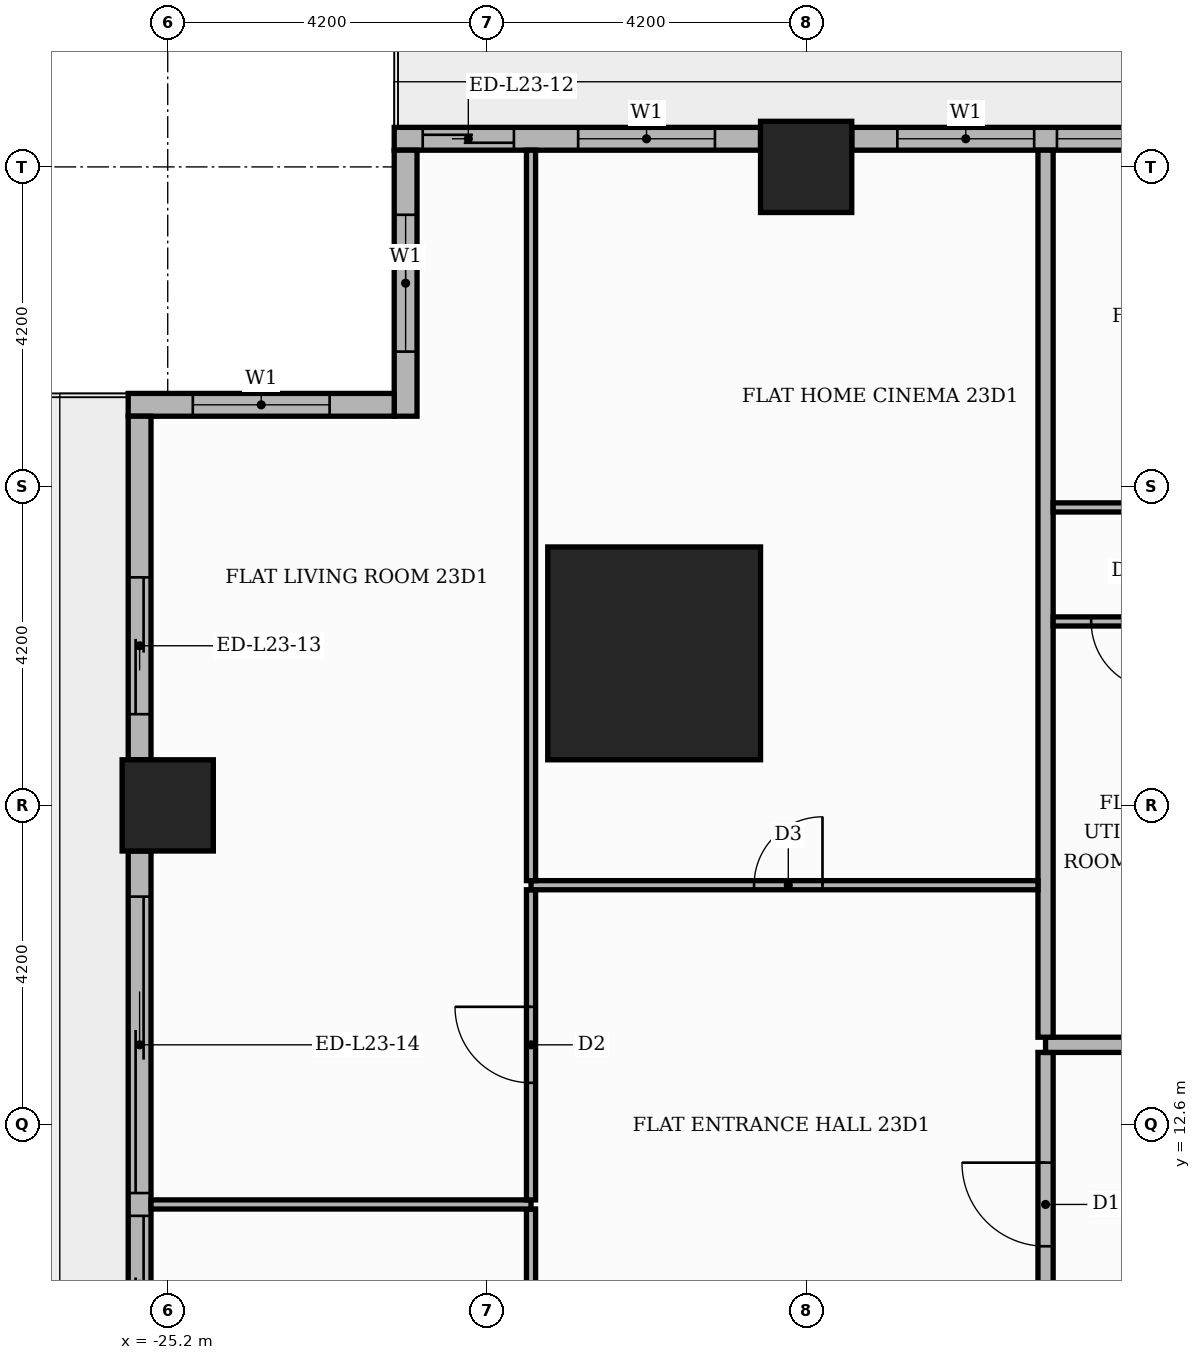
"""IFC4 building model, lengths in metres.
Left out: names, types, materials, properties, quantities, classifications, styles, units other than length and angle.
Written with IfcOpenShell. Run it as: python <this file> out.ifc"""

import sys

from ifc_helpers import new_model, si_unit, direction, frame, frame_2d, origin, origin_2d, place, context, subcontext, project, spatial, rectangle, extrude, element, fill, save


model = new_model("IFC4")
c1 = context("Model", 3, precision=1e-05, world=origin(), true_north=direction((0.0, 1.0)))
c2 = subcontext(c1, "Body", "Model", "MODEL_VIEW")
j1 = project(units=[si_unit("LENGTHUNIT", "METRE"), si_unit("PLANEANGLEUNIT", "RADIAN")], contexts=[c1])
p1 = place(None, origin())
s1 = spatial("IfcSite", under=j1, at=p1, CompositionType="ELEMENT")
p2 = place(p1, origin())
s2 = spatial("IfcBuilding", under=s1, at=p2, CompositionType="ELEMENT")
p3 = place(p2, frame((0.0, 0.0, 98.7)))
s3 = spatial("IfcBuildingStorey", under=s2, at=p3, CompositionType="ELEMENT", Elevation=98.7)
p4 = place(p3, frame((-18.8, 18.8, 0.0), z_axis=(0.0, 0.0, 1.0), x_axis=(1.0, 0.0, 0.0)))
e1 = element("IfcColumn", 1, at=p4, inside=s3, PredefinedType="COLUMN", context=c2, shape_type="SweptSolid", body=[
    extrude(rectangle(XDim=2.8, YDim=2.8, at=origin_2d()), origin(), (0.0, 0.0, 1.0), 3.9),
])
for number, where, z_axis, x_axis in (
    (2, (-16.8, 25.2, 0.0), (0.0, 0.0, 1.0), (1.0, 0.0, 0.0)),
    (3, (-25.2, 16.8, 0.0), (0.0, 0.0, 1.0), (1.0, 0.0, 0.0)),
):
    element("IfcColumn", number, at=place(p3, frame(where, z_axis=z_axis, x_axis=x_axis)), inside=s3, PredefinedType="COLUMN", context=c2, shape_type="SweptSolid", body=[
        extrude(rectangle(XDim=1.2, YDim=1.2, at=origin_2d()), origin(), (0.0, 0.0, 1.0), 3.9),
    ])
p5 = place(p3, frame((-9.0, 25.57, 0.0), z_axis=(0.0, 0.0, 1.0), x_axis=(-1.0, 0.0, 0.0)))
e4 = element("IfcWall", 4, at=p5, inside=s3, PredefinedType="STANDARD", context=c2, shape_type="SweptSolid", body=[
    extrude(rectangle(XDim=7.2, YDim=0.3, at=frame_2d((3.6, 0.0))), origin(), (0.0, 0.0, 1.0), 3.48),
])
p6 = place(p5, frame((0.6, 0.0, 0.9)))
e5 = element("IfcOpeningElement", 5, at=p6, cuts=e4, PredefinedType="OPENING", context=c2, shape_type="SweptSolid", body=[
    extrude(rectangle(XDim=3.9, YDim=2.1, at=frame_2d((1.95, 1.05))), frame((0.0, 0.16, 0.0), z_axis=(0.0, -1.0, 0.0), x_axis=(1.0, 0.0, 0.0)), (0.0, 0.0, 1.0), 0.32),
])
p7 = place(p5, frame((4.8, 0.0, 0.9)))
e6 = element("IfcOpeningElement", 6, at=p7, cuts=e4, PredefinedType="OPENING", context=c2, shape_type="SweptSolid", body=[
    extrude(rectangle(XDim=1.8, YDim=2.1, at=frame_2d((0.9, 1.05))), frame((0.0, 0.16, 0.0), z_axis=(0.0, -1.0, 0.0), x_axis=(1.0, 0.0, 0.0)), (0.0, 0.0, 1.0), 0.32),
])
p8 = place(p3, frame((-17.4, 25.57, 0.0), z_axis=(0.0, 0.0, 1.0), x_axis=(-1.0, 0.0, 0.0)))
e7 = element("IfcWall", 7, at=p8, inside=s3, PredefinedType="STANDARD", context=c2, shape_type="SweptSolid", body=[
    extrude(rectangle(XDim=4.82, YDim=0.3, at=frame_2d((2.41, 0.0))), origin(), (0.0, 0.0, 1.0), 3.48),
])
p9 = place(p8, frame((0.6, 0.0, 0.9)))
e8 = element("IfcOpeningElement", 8, at=p9, cuts=e7, PredefinedType="OPENING", context=c2, shape_type="SweptSolid", body=[
    extrude(rectangle(XDim=1.8, YDim=2.1, at=frame_2d((0.9, 1.05))), frame((0.0, 0.16, 0.0), z_axis=(0.0, -1.0, 0.0), x_axis=(1.0, 0.0, 0.0)), (0.0, 0.0, 1.0), 0.32),
])
p10 = place(p8, frame((3.245, 0.0, 0.0)))
e9 = element("IfcOpeningElement", 9, at=p10, cuts=e7, PredefinedType="OPENING", context=c2, shape_type="SweptSolid", body=[
    extrude(rectangle(XDim=1.2, YDim=2.4, at=frame_2d((0.6, 1.2))), frame((0.0, 0.16, 0.0), z_axis=(0.0, -1.0, 0.0), x_axis=(1.0, 0.0, 0.0)), (0.0, 0.0, 1.0), 0.32),
])
p11 = place(p3, frame((-22.07, 25.42, 0.0), z_axis=(0.0, 0.0, 1.0), x_axis=(0.0, -1.0, 0.0)))
e10 = element("IfcWall", 10, at=p11, inside=s3, PredefinedType="STANDARD", context=c2, shape_type="SweptSolid", body=[
    extrude(rectangle(XDim=3.5, YDim=0.3, at=frame_2d((1.75, 0.0))), origin(), (0.0, 0.0, 1.0), 3.48),
])
p12 = place(p11, frame((0.85, 0.0, 0.9)))
e11 = element("IfcOpeningElement", 11, at=p12, cuts=e10, PredefinedType="OPENING", context=c2, shape_type="SweptSolid", body=[
    extrude(rectangle(XDim=1.8, YDim=2.1, at=frame_2d((0.9, 1.05))), frame((0.0, 0.16, 0.0), z_axis=(0.0, -1.0, 0.0), x_axis=(1.0, 0.0, 0.0)), (0.0, 0.0, 1.0), 0.32),
])
p13 = place(p3, frame((-22.22, 22.07, 0.0), z_axis=(0.0, 0.0, 1.0), x_axis=(-1.0, 0.0, 0.0)))
e12 = element("IfcWall", 12, at=p13, inside=s3, PredefinedType="STANDARD", context=c2, shape_type="SweptSolid", body=[
    extrude(rectangle(XDim=3.5, YDim=0.3, at=frame_2d((1.75, 0.0))), origin(), (0.0, 0.0, 1.0), 3.48),
])
p14 = place(p13, frame((0.85, 0.0, 0.9)))
e13 = element("IfcOpeningElement", 13, at=p14, cuts=e12, PredefinedType="OPENING", context=c2, shape_type="SweptSolid", body=[
    extrude(rectangle(XDim=1.8, YDim=2.1, at=frame_2d((0.9, 1.05))), frame((0.0, 0.16, 0.0), z_axis=(0.0, -1.0, 0.0), x_axis=(1.0, 0.0, 0.0)), (0.0, 0.0, 1.0), 0.32),
])
p15 = place(p3, frame((-25.57, 21.92, 0.0), z_axis=(0.0, 0.0, 1.0), x_axis=(0.0, -1.0, 0.0)))
e14 = element("IfcWall", 14, at=p15, inside=s3, PredefinedType="STANDARD", context=c2, shape_type="SweptSolid", body=[
    extrude(rectangle(XDim=4.52, YDim=0.3, at=frame_2d((2.26, 0.0))), origin(), (0.0, 0.0, 1.0), 3.48),
])
p16 = place(p15, frame((2.12, 0.0, 0.0)))
e15 = element("IfcOpeningElement", 15, at=p16, cuts=e14, PredefinedType="OPENING", context=c2, shape_type="SweptSolid", body=[
    extrude(rectangle(XDim=1.8, YDim=2.4, at=frame_2d((0.9, 1.2))), frame((0.0, 0.16, 0.0), z_axis=(0.0, -1.0, 0.0), x_axis=(1.0, 0.0, 0.0)), (0.0, 0.0, 1.0), 0.32),
])
p17 = place(p3, frame((-25.57, 16.2, 0.0), z_axis=(0.0, 0.0, 1.0), x_axis=(0.0, -1.0, 0.0)))
e16 = element("IfcWall", 16, at=p17, inside=s3, PredefinedType="STANDARD", context=c2, shape_type="SweptSolid", body=[
    extrude(rectangle(XDim=7.2, YDim=0.3, at=frame_2d((3.6, 0.0))), origin(), (0.0, 0.0, 1.0), 3.48),
])
p18 = place(p17, frame((0.6, 0.0, 0.0)))
e17 = element("IfcOpeningElement", 17, at=p18, cuts=e16, PredefinedType="OPENING", context=c2, shape_type="SweptSolid", body=[
    extrude(rectangle(XDim=3.9, YDim=2.4, at=frame_2d((1.95, 1.2))), frame((0.0, 0.16, 0.0), z_axis=(0.0, -1.0, 0.0), x_axis=(1.0, 0.0, 0.0)), (0.0, 0.0, 1.0), 0.32),
])
p19 = place(p17, frame((4.8, 0.0, 0.0)))
e18 = element("IfcOpeningElement", 18, at=p19, cuts=e16, PredefinedType="OPENING", context=c2, shape_type="SweptSolid", body=[
    extrude(rectangle(XDim=1.8, YDim=2.4, at=frame_2d((0.9, 1.2))), frame((0.0, 0.16, 0.0), z_axis=(0.0, -1.0, 0.0), x_axis=(1.0, 0.0, 0.0)), (0.0, 0.0, 1.0), 0.32),
])
p20 = place(p3, frame((-13.65, -13.55, 0.0), z_axis=(0.0, 0.0, 1.0), x_axis=(0.0, 1.0, 0.0)))
e19 = element("IfcWall", 19, at=p20, inside=s3, PredefinedType="PARTITIONING", context=c2, shape_type="SweptSolid", body=[
    extrude(rectangle(XDim=27.1, YDim=0.2, at=frame_2d((13.55, 0.0))), origin(), (0.0, 0.0, 1.0), 3.48),
])
p21 = place(p20, frame((24.55, 0.0, 0.0)))
e20 = element("IfcOpeningElement", 20, at=p21, cuts=e19, PredefinedType="OPENING", context=c2, shape_type="SweptSolid", body=[
    extrude(rectangle(XDim=1.1, YDim=2.4, at=frame_2d((0.55, 1.2))), frame((0.0, 0.11, 0.0), z_axis=(0.0, -1.0, 0.0), x_axis=(1.0, 0.0, 0.0)), (0.0, 0.0, 1.0), 0.22),
])
p22 = place(p3, frame((-20.42, 7.41, 0.0), z_axis=(0.0, 0.0, 1.0), x_axis=(0.0, 1.0, 0.0)))
e21 = element("IfcWall", 21, at=p22, inside=s3, PredefinedType="PARTITIONING", context=c2, shape_type="SweptSolid", body=[
    extrude(rectangle(XDim=4.08, YDim=0.12, at=frame_2d((2.04, 0.0))), origin(), (0.0, 0.0, 1.0), 3.48),
])
p23 = place(p22, frame((1.54, 0.0, 0.0)))
e22 = element("IfcOpeningElement", 22, at=p23, cuts=e21, PredefinedType="OPENING", context=c2, shape_type="SweptSolid", body=[
    extrude(rectangle(XDim=1.0, YDim=2.1, at=frame_2d((0.5, 1.05))), frame((0.0, 0.07, 0.0), z_axis=(0.0, -1.0, 0.0), x_axis=(1.0, 0.0, 0.0)), (0.0, 0.0, 1.0), 0.14),
])
p24 = place(p3, frame((-25.42, 11.55, 0.0), z_axis=(0.0, 0.0, 1.0), x_axis=(1.0, 0.0, 0.0)))
e23 = element("IfcWall", 23, at=p24, inside=s3, PredefinedType="PARTITIONING", context=c2, shape_type="SweptSolid", body=[
    extrude(rectangle(XDim=5.0, YDim=0.12, at=frame_2d((2.5, 0.0))), origin(), (0.0, 0.0, 1.0), 3.48),
])
p25 = place(p3, frame((-20.42, 11.61, 0.0), z_axis=(0.0, 0.0, 1.0), x_axis=(0.0, 1.0, 0.0)))
e24 = element("IfcWall", 24, at=p25, inside=s3, PredefinedType="PARTITIONING", context=c2, shape_type="SweptSolid", body=[
    extrude(rectangle(XDim=4.08, YDim=0.12, at=frame_2d((2.04, 0.0))), origin(), (0.0, 0.0, 1.0), 3.48),
])
p26 = place(p25, frame((1.54, 0.0, 0.0)))
e25 = element("IfcOpeningElement", 25, at=p26, cuts=e24, PredefinedType="OPENING", context=c2, shape_type="SweptSolid", body=[
    extrude(rectangle(XDim=1.0, YDim=2.1, at=frame_2d((0.5, 1.05))), frame((0.0, 0.07, 0.0), z_axis=(0.0, -1.0, 0.0), x_axis=(1.0, 0.0, 0.0)), (0.0, 0.0, 1.0), 0.14),
])
p27 = place(p3, frame((-13.65, 13.65, 0.0), z_axis=(0.0, 0.0, 1.0), x_axis=(1.0, 0.0, 0.0)))
e26 = element("IfcWall", 26, at=p27, inside=s3, PredefinedType="PARTITIONING", context=c2, shape_type="SweptSolid", body=[
    extrude(rectangle(XDim=39.07, YDim=0.2, at=frame_2d((19.535, 0.0))), origin(), (0.0, 0.0, 1.0), 3.48),
])
p28 = place(p27, frame((24.65, 0.0, 0.0)))
e27 = element("IfcOpeningElement", 27, at=p28, cuts=e26, PredefinedType="OPENING", context=c2, shape_type="SweptSolid", body=[
    extrude(rectangle(XDim=1.1, YDim=2.4, at=frame_2d((0.55, 1.2))), frame((0.0, 0.11, 0.0), z_axis=(0.0, -1.0, 0.0), x_axis=(1.0, 0.0, 0.0)), (0.0, 0.0, 1.0), 0.22),
])
p29 = place(p27, frame((14.15, 0.0, 0.0)))
e28 = element("IfcOpeningElement", 28, at=p29, cuts=e26, PredefinedType="OPENING", context=c2, shape_type="SweptSolid", body=[
    extrude(rectangle(XDim=1.1, YDim=2.4, at=frame_2d((0.55, 1.2))), frame((0.0, 0.11, 0.0), z_axis=(0.0, -1.0, 0.0), x_axis=(1.0, 0.0, 0.0)), (0.0, 0.0, 1.0), 0.22),
])
p30 = place(p3, frame((-13.65, 13.75, 0.0), z_axis=(0.0, 0.0, 1.0), x_axis=(0.0, 1.0, 0.0)))
e29 = element("IfcWall", 29, at=p30, inside=s3, PredefinedType="PARTITIONING", context=c2, shape_type="SweptSolid", body=[
    extrude(rectangle(XDim=11.67, YDim=0.2, at=frame_2d((5.835, 0.0))), origin(), (0.0, 0.0, 1.0), 3.48),
])
p31 = place(p3, frame((-20.42, 15.75, 0.0), z_axis=(0.0, 0.0, 1.0), x_axis=(1.0, 0.0, 0.0)))
e30 = element("IfcWall", 30, at=p31, inside=s3, PredefinedType="PARTITIONING", context=c2, shape_type="SweptSolid", body=[
    extrude(rectangle(XDim=6.67, YDim=0.12, at=frame_2d((3.335, 0.0))), origin(), (0.0, 0.0, 1.0), 3.48),
])
p32 = place(p31, frame((2.935, 0.0, 0.0)))
e31 = element("IfcOpeningElement", 31, at=p32, cuts=e30, PredefinedType="OPENING", context=c2, shape_type="SweptSolid", body=[
    extrude(rectangle(XDim=0.9, YDim=2.1, at=frame_2d((0.45, 1.05))), frame((0.0, 0.07, 0.0), z_axis=(0.0, -1.0, 0.0), x_axis=(1.0, 0.0, 0.0)), (0.0, 0.0, 1.0), 0.14),
])
p33 = place(p3, frame((-20.42, 15.81, 0.0), z_axis=(0.0, 0.0, 1.0), x_axis=(0.0, 1.0, 0.0)))
e32 = element("IfcWall", 32, at=p33, inside=s3, PredefinedType="PARTITIONING", context=c2, shape_type="SweptSolid", body=[
    extrude(rectangle(XDim=9.61, YDim=0.12, at=frame_2d((4.805, 0.0))), origin(), (0.0, 0.0, 1.0), 3.48),
])
p34 = place(p3, frame((-13.55, 19.22, 0.0), z_axis=(0.0, 0.0, 1.0), x_axis=(1.0, 0.0, 0.0)))
e33 = element("IfcWall", 33, at=p34, inside=s3, PredefinedType="PARTITIONING", context=c2, shape_type="SweptSolid", body=[
    extrude(rectangle(XDim=12.5, YDim=0.12, at=frame_2d((6.25, 0.0))), origin(), (0.0, 0.0, 1.0), 3.48),
])
p35 = place(p34, frame((8.9, 0.0, 0.0)))
e34 = element("IfcOpeningElement", 34, at=p35, cuts=e33, PredefinedType="OPENING", context=c2, shape_type="SweptSolid", body=[
    extrude(rectangle(XDim=0.9, YDim=2.1, at=frame_2d((0.45, 1.05))), frame((0.0, 0.07, 0.0), z_axis=(0.0, -1.0, 0.0), x_axis=(1.0, 0.0, 0.0)), (0.0, 0.0, 1.0), 0.14),
])
p36 = place(p34, frame((4.55, 0.0, 0.0)))
e35 = element("IfcOpeningElement", 35, at=p36, cuts=e33, PredefinedType="OPENING", context=c2, shape_type="SweptSolid", body=[
    extrude(rectangle(XDim=0.9, YDim=2.1, at=frame_2d((0.45, 1.05))), frame((0.0, 0.07, 0.0), z_axis=(0.0, -1.0, 0.0), x_axis=(1.0, 0.0, 0.0)), (0.0, 0.0, 1.0), 0.14),
])
p37 = place(p34, frame((2.45, 0.0, 0.0)))
e36 = element("IfcOpeningElement", 36, at=p37, cuts=e33, PredefinedType="OPENING", context=c2, shape_type="SweptSolid", body=[
    extrude(rectangle(XDim=0.9, YDim=2.1, at=frame_2d((0.45, 1.05))), frame((0.0, 0.07, 0.0), z_axis=(0.0, -1.0, 0.0), x_axis=(1.0, 0.0, 0.0)), (0.0, 0.0, 1.0), 0.14),
])
p38 = place(p34, frame((0.5, 0.0, 0.0)))
e37 = element("IfcOpeningElement", 37, at=p38, cuts=e33, PredefinedType="OPENING", context=c2, shape_type="SweptSolid", body=[
    extrude(rectangle(XDim=0.9, YDim=2.1, at=frame_2d((0.45, 1.05))), frame((0.0, 0.07, 0.0), z_axis=(0.0, -1.0, 0.0), x_axis=(1.0, 0.0, 0.0)), (0.0, 0.0, 1.0), 0.14),
])
p39 = place(p3, frame((-13.55, 20.72, 0.0), z_axis=(0.0, 0.0, 1.0), x_axis=(1.0, 0.0, 0.0)))
e38 = element("IfcWall", 38, at=p39, inside=s3, PredefinedType="PARTITIONING", context=c2, shape_type="SweptSolid", body=[
    extrude(rectangle(XDim=18.7, YDim=0.12, at=frame_2d((9.35, 0.0))), origin(), (0.0, 0.0, 1.0), 3.48),
])
p40 = place(p39, frame((15.15, 0.0, 0.0)))
e39 = element("IfcOpeningElement", 39, at=p40, cuts=e38, PredefinedType="OPENING", context=c2, shape_type="SweptSolid", body=[
    extrude(rectangle(XDim=1.0, YDim=2.1, at=frame_2d((0.5, 1.05))), frame((0.0, 0.07, 0.0), z_axis=(0.0, -1.0, 0.0), x_axis=(1.0, 0.0, 0.0)), (0.0, 0.0, 1.0), 0.14),
])
p41 = place(p39, frame((9.95, 0.0, 0.0)))
e40 = element("IfcOpeningElement", 40, at=p41, cuts=e38, PredefinedType="OPENING", context=c2, shape_type="SweptSolid", body=[
    extrude(rectangle(XDim=0.9, YDim=2.1, at=frame_2d((0.45, 1.05))), frame((0.0, 0.07, 0.0), z_axis=(0.0, -1.0, 0.0), x_axis=(1.0, 0.0, 0.0)), (0.0, 0.0, 1.0), 0.14),
])
p42 = place(p39, frame((1.55, 0.0, 0.0)))
e41 = element("IfcOpeningElement", 41, at=p42, cuts=e38, PredefinedType="OPENING", context=c2, shape_type="SweptSolid", body=[
    extrude(rectangle(XDim=0.9, YDim=2.1, at=frame_2d((0.45, 1.05))), frame((0.0, 0.07, 0.0), z_axis=(0.0, -1.0, 0.0), x_axis=(1.0, 0.0, 0.0)), (0.0, 0.0, 1.0), 0.14),
])
p43 = place(p6, origin())
e42 = element("IfcWindow", 42, at=p43, inside=s3, PartitioningType="SINGLE_PANEL", PredefinedType="WINDOW", context=c2, shape_type="SweptSolid", body=[
    extrude(rectangle(XDim=3.9, YDim=2.1, at=frame_2d((1.95, 1.05))), frame((0.0, 0.03, 0.0), z_axis=(0.0, -1.0, 0.0), x_axis=(1.0, 0.0, 0.0)), (0.0, 0.0, 1.0), 0.06),
])
fill(e5, e42)
p44 = place(p7, origin())
e43 = element("IfcWindow", 43, at=p44, inside=s3, PartitioningType="SINGLE_PANEL", PredefinedType="WINDOW", context=c2, shape_type="SweptSolid", body=[
    extrude(rectangle(XDim=1.8, YDim=2.1, at=frame_2d((0.9, 1.05))), frame((0.0, 0.03, 0.0), z_axis=(0.0, -1.0, 0.0), x_axis=(1.0, 0.0, 0.0)), (0.0, 0.0, 1.0), 0.06),
])
fill(e6, e43)
p45 = place(p9, origin())
e44 = element("IfcWindow", 44, at=p45, inside=s3, PartitioningType="SINGLE_PANEL", PredefinedType="WINDOW", context=c2, shape_type="SweptSolid", body=[
    extrude(rectangle(XDim=1.8, YDim=2.1, at=frame_2d((0.9, 1.05))), frame((0.0, 0.03, 0.0), z_axis=(0.0, -1.0, 0.0), x_axis=(1.0, 0.0, 0.0)), (0.0, 0.0, 1.0), 0.06),
])
fill(e8, e44)
p46 = place(p10, origin())
e45 = element("IfcDoor", 45, at=p46, inside=s3, OperationType="SLIDING_TO_RIGHT", PredefinedType="DOOR", context=c2, shape_type="SweptSolid", body=[
    extrude(rectangle(XDim=1.2, YDim=2.4, at=frame_2d((0.6, 1.2))), frame((0.0, 0.025, 0.0), z_axis=(0.0, -1.0, 0.0), x_axis=(1.0, 0.0, 0.0)), (0.0, 0.0, 1.0), 0.05),
])
fill(e9, e45)
p47 = place(p12, origin())
e46 = element("IfcWindow", 46, at=p47, inside=s3, PartitioningType="SINGLE_PANEL", PredefinedType="WINDOW", context=c2, shape_type="SweptSolid", body=[
    extrude(rectangle(XDim=1.8, YDim=2.1, at=frame_2d((0.9, 1.05))), frame((0.0, 0.03, 0.0), z_axis=(0.0, -1.0, 0.0), x_axis=(1.0, 0.0, 0.0)), (0.0, 0.0, 1.0), 0.06),
])
fill(e11, e46)
p48 = place(p14, origin())
e47 = element("IfcWindow", 47, at=p48, inside=s3, PartitioningType="SINGLE_PANEL", PredefinedType="WINDOW", context=c2, shape_type="SweptSolid", body=[
    extrude(rectangle(XDim=1.8, YDim=2.1, at=frame_2d((0.9, 1.05))), frame((0.0, 0.03, 0.0), z_axis=(0.0, -1.0, 0.0), x_axis=(1.0, 0.0, 0.0)), (0.0, 0.0, 1.0), 0.06),
])
fill(e13, e47)
p49 = place(p16, origin())
e48 = element("IfcDoor", 48, at=p49, inside=s3, OperationType="SLIDING_TO_RIGHT", PredefinedType="DOOR", context=c2, shape_type="SweptSolid", body=[
    extrude(rectangle(XDim=1.8, YDim=2.4, at=frame_2d((0.9, 1.2))), frame((0.0, 0.025, 0.0), z_axis=(0.0, -1.0, 0.0), x_axis=(1.0, 0.0, 0.0)), (0.0, 0.0, 1.0), 0.05),
])
fill(e15, e48)
p50 = place(p18, origin())
e49 = element("IfcDoor", 49, at=p50, inside=s3, OperationType="SLIDING_TO_LEFT", PredefinedType="DOOR", context=c2, shape_type="SweptSolid", body=[
    extrude(rectangle(XDim=3.9, YDim=2.4, at=frame_2d((1.95, 1.2))), frame((0.0, 0.025, 0.0), z_axis=(0.0, -1.0, 0.0), x_axis=(1.0, 0.0, 0.0)), (0.0, 0.0, 1.0), 0.05),
])
fill(e17, e49)
p51 = place(p19, origin())
e50 = element("IfcDoor", 50, at=p51, inside=s3, OperationType="SLIDING_TO_RIGHT", PredefinedType="DOOR", context=c2, shape_type="SweptSolid", body=[
    extrude(rectangle(XDim=1.8, YDim=2.4, at=frame_2d((0.9, 1.2))), frame((0.0, 0.025, 0.0), z_axis=(0.0, -1.0, 0.0), x_axis=(1.0, 0.0, 0.0)), (0.0, 0.0, 1.0), 0.05),
])
fill(e18, e50)
p52 = place(p38, frame((0.9, 0.0, 0.0), z_axis=(0.0, 0.0, 1.0), x_axis=(-1.0, 0.0, 0.0)))
e51 = element("IfcDoor", 51, at=p52, inside=s3, OperationType="SINGLE_SWING_RIGHT", PredefinedType="DOOR", context=c2, shape_type="SweptSolid", body=[
    extrude(rectangle(XDim=0.9, YDim=2.1, at=frame_2d((0.45, 1.05))), frame((0.0, 0.025, 0.0), z_axis=(0.0, -1.0, 0.0), x_axis=(1.0, 0.0, 0.0)), (0.0, 0.0, 1.0), 0.05),
])
fill(e37, e51)
p53 = place(p21, origin())
e52 = element("IfcDoor", 52, at=p53, inside=s3, OperationType="SINGLE_SWING_RIGHT", PredefinedType="DOOR", context=c2, shape_type="SweptSolid", body=[
    extrude(rectangle(XDim=1.1, YDim=2.4, at=frame_2d((0.55, 1.2))), frame((0.0, 0.025, 0.0), z_axis=(0.0, -1.0, 0.0), x_axis=(1.0, 0.0, 0.0)), (0.0, 0.0, 1.0), 0.05),
])
fill(e20, e52)
p54 = place(p32, origin())
e53 = element("IfcDoor", 53, at=p54, inside=s3, OperationType="SINGLE_SWING_RIGHT", PredefinedType="DOOR", context=c2, shape_type="SweptSolid", body=[
    extrude(rectangle(XDim=0.9, YDim=2.1, at=frame_2d((0.45, 1.05))), frame((0.0, 0.025, 0.0), z_axis=(0.0, -1.0, 0.0), x_axis=(1.0, 0.0, 0.0)), (0.0, 0.0, 1.0), 0.05),
])
fill(e31, e53)
p55 = place(p26, origin())
e54 = element("IfcDoor", 54, at=p55, inside=s3, OperationType="SINGLE_SWING_RIGHT", PredefinedType="DOOR", context=c2, shape_type="SweptSolid", body=[
    extrude(rectangle(XDim=1.0, YDim=2.1, at=frame_2d((0.5, 1.05))), frame((0.0, 0.025, 0.0), z_axis=(0.0, -1.0, 0.0), x_axis=(1.0, 0.0, 0.0)), (0.0, 0.0, 1.0), 0.05),
])
fill(e25, e54)
save(model, sys.argv[1])
